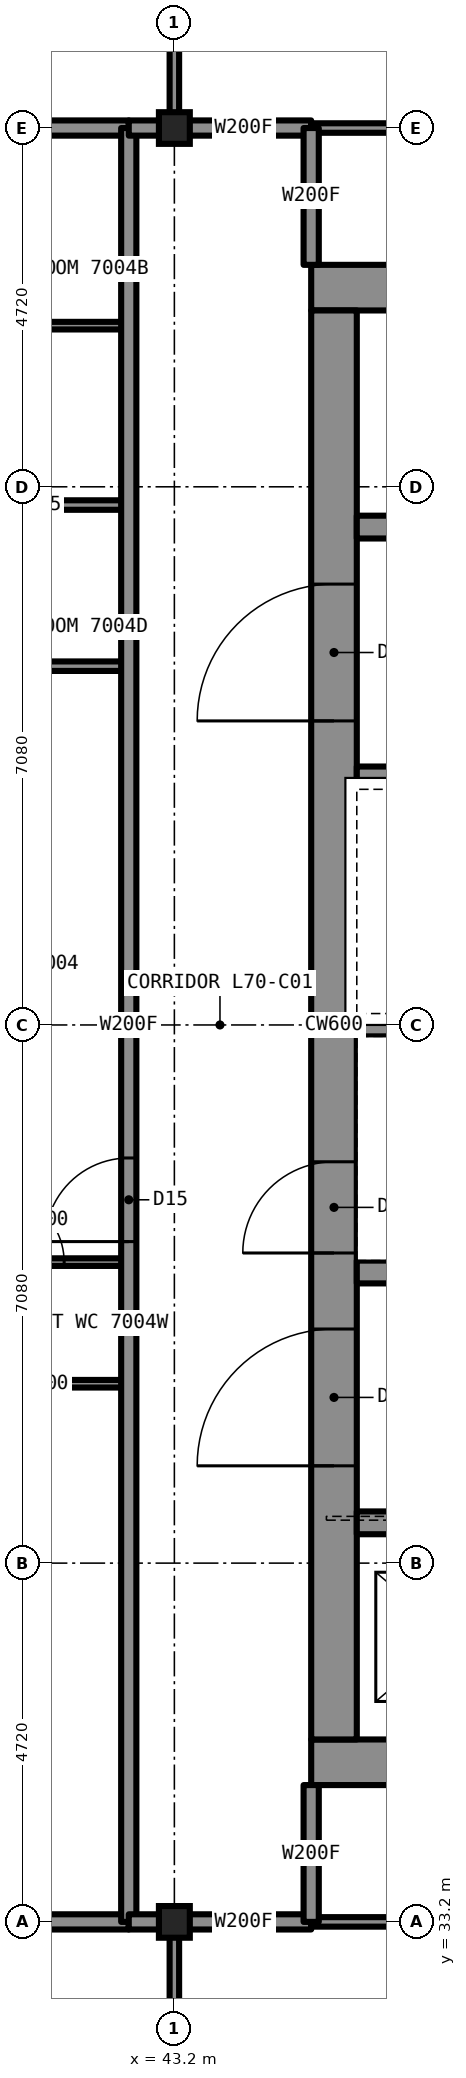
"""IFC4 building model, lengths in metres.
Left out: names, types, materials, properties, quantities, classifications, styles, units other than length and angle.
Written with IfcOpenShell. Run it as: python <this file> out.ifc"""

import sys

from ifc_helpers import new_model, si_unit, direction, frame, frame_2d, origin, origin_2d, place, context, subcontext, project, spatial, rectangle, i_section, extrude, element, fill, save


model = new_model("IFC4")
c1 = context("Model", 3, precision=1e-05, world=origin(), true_north=direction((0.0, 1.0)))
c2 = subcontext(c1, "Body", "Model", "MODEL_VIEW")
j1 = project(units=[si_unit("LENGTHUNIT", "METRE"), si_unit("PLANEANGLEUNIT", "RADIAN")], contexts=[c1])
p1 = place(None, origin())
s1 = spatial("IfcSite", under=j1, at=p1, CompositionType="ELEMENT")
p2 = place(p1, origin())
s2 = spatial("IfcBuilding", under=s1, at=p2, CompositionType="ELEMENT")
p3 = place(p2, frame((0.0, 0.0, 254.7)))
s3 = spatial("IfcBuildingStorey", under=s2, at=p3, CompositionType="ELEMENT", Elevation=254.7)
for number, where, z_axis, x_axis in (
    (1, (43.2, 33.2, 0.0), (0.0, 0.0, 1.0), (1.0, 0.0, 0.0)),
    (2, (43.2, 56.8, 0.0), (0.0, 0.0, 1.0), (1.0, 0.0, 0.0)),
):
    element("IfcColumn", number, at=place(p3, frame(where, z_axis=z_axis, x_axis=x_axis)), inside=s3, PredefinedType="COLUMN", context=c2, shape_type="SweptSolid", body=[
        extrude(i_section(OverallWidth=0.406, OverallDepth=0.417, WebThickness=0.03, FlangeThickness=0.048, at=origin_2d()), origin(), (0.0, 0.0, 1.0), 3.5),
    ])
for number, where, z_axis, x_axis in (
    (3, (45.0, 54.7, 0.0), (0.0, 0.0, 1.0), (1.0, 0.0, 0.0)),
    (4, (45.0, 35.3, 0.0), (0.0, 0.0, 1.0), (1.0, 0.0, 0.0)),
):
    element("IfcWall", number, at=place(p3, frame(where, z_axis=z_axis, x_axis=x_axis)), inside=s3, PredefinedType="SHEAR", context=c2, shape_type="SweptSolid", body=[
        extrude(rectangle(XDim=20.0, YDim=0.6, at=frame_2d((10.0, 0.0))), origin(), (0.0, 0.0, 1.0), 3.5),
    ])
p4 = place(p3, frame((45.3, 35.6, 0.0), z_axis=(0.0, 0.0, 1.0), x_axis=(0.0, 1.0, 0.0)))
e5 = element("IfcWall", 5, at=p4, inside=s3, PredefinedType="SHEAR", context=c2, shape_type="SweptSolid", body=[
    extrude(rectangle(XDim=18.8, YDim=0.6, at=frame_2d((9.4, 0.0))), origin(), (0.0, 0.0, 1.0), 3.5),
])
p5 = place(p4, frame((13.4, 0.0, 0.0)))
e6 = element("IfcOpeningElement", 6, at=p5, cuts=e5, PredefinedType="OPENING", context=c2, shape_type="SweptSolid", body=[
    extrude(rectangle(XDim=1.8, YDim=2.2, at=frame_2d((0.9, 1.1))), frame((0.0, 0.31, 0.0), z_axis=(0.0, -1.0, 0.0), x_axis=(1.0, 0.0, 0.0)), (0.0, 0.0, 1.0), 0.62),
])
p6 = place(p4, frame((3.6, 0.0, 0.0)))
e7 = element("IfcOpeningElement", 7, at=p6, cuts=e5, PredefinedType="OPENING", context=c2, shape_type="SweptSolid", body=[
    extrude(rectangle(XDim=1.8, YDim=2.2, at=frame_2d((0.9, 1.1))), frame((0.0, 0.31, 0.0), z_axis=(0.0, -1.0, 0.0), x_axis=(1.0, 0.0, 0.0)), (0.0, 0.0, 1.0), 0.62),
])
p7 = place(p4, frame((6.4, 0.0, 0.0)))
e8 = element("IfcOpeningElement", 8, at=p7, cuts=e5, PredefinedType="OPENING", context=c2, shape_type="SweptSolid", body=[
    extrude(rectangle(XDim=1.2, YDim=2.2, at=frame_2d((0.6, 1.1))), frame((0.0, 0.31, 0.0), z_axis=(0.0, -1.0, 0.0), x_axis=(1.0, 0.0, 0.0)), (0.0, 0.0, 1.0), 0.62),
])
p8 = place(p3, frame((45.6, 51.55, 0.0), z_axis=(0.0, 0.0, 1.0), x_axis=(1.0, 0.0, 0.0)))
e9 = element("IfcWall", 9, at=p8, inside=s3, PredefinedType="SHEAR", context=c2, shape_type="SweptSolid", body=[
    extrude(rectangle(XDim=18.8, YDim=0.3, at=frame_2d((9.4, 0.0))), origin(), (0.0, 0.0, 1.0), 3.5),
])
p9 = place(p8, frame((4.8, 0.0, 0.0)))
e10 = element("IfcOpeningElement", 10, at=p9, cuts=e9, PredefinedType="OPENING", context=c2, shape_type="SweptSolid", body=[
    extrude(rectangle(XDim=1.0, YDim=2.1, at=frame_2d((0.5, 1.05))), frame((0.0, 0.16, 0.0), z_axis=(0.0, -1.0, 0.0), x_axis=(1.0, 0.0, 0.0)), (0.0, 0.0, 1.0), 0.32),
])
p10 = place(p8, frame((11.6, 0.0, 0.0)))
e11 = element("IfcOpeningElement", 11, at=p10, cuts=e9, PredefinedType="OPENING", context=c2, shape_type="SweptSolid", body=[
    extrude(rectangle(XDim=1.1, YDim=2.2, at=frame_2d((0.55, 1.1))), frame((0.0, 0.16, 0.0), z_axis=(0.0, -1.0, 0.0), x_axis=(1.0, 0.0, 0.0)), (0.0, 0.0, 1.0), 0.32),
])
p11 = place(p8, frame((14.3, 0.0, 0.0)))
e12 = element("IfcOpeningElement", 12, at=p11, cuts=e9, PredefinedType="OPENING", context=c2, shape_type="SweptSolid", body=[
    extrude(rectangle(XDim=1.1, YDim=2.2, at=frame_2d((0.55, 1.1))), frame((0.0, 0.16, 0.0), z_axis=(0.0, -1.0, 0.0), x_axis=(1.0, 0.0, 0.0)), (0.0, 0.0, 1.0), 0.32),
])
p12 = place(p3, frame((45.6, 38.45, 0.0), z_axis=(0.0, 0.0, 1.0), x_axis=(1.0, 0.0, 0.0)))
e13 = element("IfcWall", 13, at=p12, inside=s3, PredefinedType="SHEAR", context=c2, shape_type="SweptSolid", body=[
    extrude(rectangle(XDim=18.8, YDim=0.3, at=frame_2d((9.4, 0.0))), origin(), (0.0, 0.0, 1.0), 3.5),
])
p13 = place(p12, frame((0.7, 0.0, 0.0)))
e14 = element("IfcOpeningElement", 14, at=p13, cuts=e13, PredefinedType="OPENING", context=c2, shape_type="SweptSolid", body=[
    extrude(rectangle(XDim=1.1, YDim=2.2, at=frame_2d((0.55, 1.1))), frame((0.0, 0.16, 0.0), z_axis=(0.0, -1.0, 0.0), x_axis=(1.0, 0.0, 0.0)), (0.0, 0.0, 1.0), 0.32),
])
p14 = place(p12, frame((3.4, 0.0, 0.0)))
e15 = element("IfcOpeningElement", 15, at=p14, cuts=e13, PredefinedType="OPENING", context=c2, shape_type="SweptSolid", body=[
    extrude(rectangle(XDim=1.1, YDim=2.2, at=frame_2d((0.55, 1.1))), frame((0.0, 0.16, 0.0), z_axis=(0.0, -1.0, 0.0), x_axis=(1.0, 0.0, 0.0)), (0.0, 0.0, 1.0), 0.32),
])
p15 = place(p12, frame((6.1, 0.0, 0.0)))
e16 = element("IfcOpeningElement", 16, at=p15, cuts=e13, PredefinedType="OPENING", context=c2, shape_type="SweptSolid", body=[
    extrude(rectangle(XDim=1.1, YDim=2.2, at=frame_2d((0.55, 1.1))), frame((0.0, 0.16, 0.0), z_axis=(0.0, -1.0, 0.0), x_axis=(1.0, 0.0, 0.0)), (0.0, 0.0, 1.0), 0.32),
])
p16 = place(p12, frame((8.8, 0.0, 0.0)))
e17 = element("IfcOpeningElement", 17, at=p16, cuts=e13, PredefinedType="OPENING", context=c2, shape_type="SweptSolid", body=[
    extrude(rectangle(XDim=1.1, YDim=2.2, at=frame_2d((0.55, 1.1))), frame((0.0, 0.16, 0.0), z_axis=(0.0, -1.0, 0.0), x_axis=(1.0, 0.0, 0.0)), (0.0, 0.0, 1.0), 0.32),
])
for number, where, z_axis, x_axis in (
    (18, (45.6, 48.25, 0.0), (0.0, 0.0, 1.0), (1.0, 0.0, 0.0)),
    (19, (45.6, 41.75, 0.0), (0.0, 0.0, 1.0), (1.0, 0.0, 0.0)),
):
    element("IfcWall", number, at=place(p3, frame(where, z_axis=z_axis, x_axis=x_axis)), inside=s3, PredefinedType="SHEAR", context=c2, shape_type="SweptSolid", body=[
        extrude(rectangle(XDim=7.1, YDim=0.3, at=frame_2d((3.55, 0.0))), origin(), (0.0, 0.0, 1.0), 3.5),
    ])
p17 = place(p3, frame((45.6, 45.0, 0.0), z_axis=(0.0, 0.0, 1.0), x_axis=(1.0, 0.0, 0.0)))
e20 = element("IfcWall", 20, at=p17, inside=s3, PredefinedType="SHEAR", context=c2, shape_type="SweptSolid", body=[
    extrude(rectangle(XDim=6.8, YDim=0.3, at=frame_2d((3.4, 0.0))), origin(), (0.0, 0.0, 1.0), 3.5),
])
p18 = place(p3, frame((43.22, 33.2, 0.0), z_axis=(0.0, 0.0, 1.0), x_axis=(1.0, 0.0, 0.0)))
e21 = element("IfcWall", 21, at=p18, inside=s3, PredefinedType="PARTITIONING", context=c2, shape_type="SweptSolid", body=[
    extrude(rectangle(XDim=1.78, YDim=0.2, at=frame_2d((0.89, 0.0))), origin(), (0.0, 0.0, 1.0), 3.33),
])
p19 = place(p3, frame((37.3, 33.2, 0.0), z_axis=(0.0, 0.0, 1.0), x_axis=(1.0, 0.0, 0.0)))
e22 = element("IfcWall", 22, at=p19, inside=s3, PredefinedType="PARTITIONING", context=c2, shape_type="SweptSolid", body=[
    extrude(rectangle(XDim=5.3, YDim=0.2, at=frame_2d((2.65, 0.0))), origin(), (0.0, 0.0, 1.0), 2.573),
])
p20 = place(p3, frame((45.0, 33.2, 0.0), z_axis=(0.0, 0.0, 1.0), x_axis=(1.0, 0.0, 0.0)))
e23 = element("IfcWall", 23, at=p20, inside=s3, PredefinedType="PARTITIONING", context=c2, shape_type="SweptSolid", body=[
    extrude(rectangle(XDim=2.92, YDim=0.125, at=frame_2d((1.46, 0.0))), origin(), (0.0, 0.0, 1.0), 3.33),
])
p21 = place(p3, frame((40.4, 41.88, 0.0), z_axis=(0.0, 0.0, 1.0), x_axis=(1.0, 0.0, 0.0)))
e24 = element("IfcWall", 24, at=p21, inside=s3, PredefinedType="PARTITIONING", context=c2, shape_type="SweptSolid", body=[
    extrude(rectangle(XDim=2.2, YDim=0.1, at=frame_2d((1.1, 0.0))), origin(), (0.0, 0.0, 1.0), 3.33),
])
p22 = place(p21, frame((0.45, 0.0, 0.0)))
e25 = element("IfcOpeningElement", 25, at=p22, cuts=e24, PredefinedType="OPENING", context=c2, shape_type="SweptSolid", body=[
    extrude(rectangle(XDim=0.9, YDim=2.1, at=frame_2d((0.45, 1.05))), frame((0.0, 0.06, 0.0), z_axis=(0.0, -1.0, 0.0), x_axis=(1.0, 0.0, 0.0)), (0.0, 0.0, 1.0), 0.12),
])
p23 = place(p3, frame((40.4, 40.28, 0.0), z_axis=(0.0, 0.0, 1.0), x_axis=(1.0, 0.0, 0.0)))
e26 = element("IfcWall", 26, at=p23, inside=s3, PredefinedType="PARTITIONING", context=c2, shape_type="SweptSolid", body=[
    extrude(rectangle(XDim=2.2, YDim=0.1, at=frame_2d((1.1, 0.0))), origin(), (0.0, 0.0, 1.0), 2.797),
])
p24 = place(p3, frame((43.22, 56.8, 0.0), z_axis=(0.0, 0.0, 1.0), x_axis=(1.0, 0.0, 0.0)))
e27 = element("IfcWall", 27, at=p24, inside=s3, PredefinedType="PARTITIONING", context=c2, shape_type="SweptSolid", body=[
    extrude(rectangle(XDim=1.78, YDim=0.2, at=frame_2d((0.89, 0.0))), origin(), (0.0, 0.0, 1.0), 3.33),
])
p25 = place(p3, frame((37.3, 56.8, 0.0), z_axis=(0.0, 0.0, 1.0), x_axis=(1.0, 0.0, 0.0)))
e28 = element("IfcWall", 28, at=p25, inside=s3, PredefinedType="PARTITIONING", context=c2, shape_type="SweptSolid", body=[
    extrude(rectangle(XDim=5.3, YDim=0.2, at=frame_2d((2.65, 0.0))), origin(), (0.0, 0.0, 1.0), 2.573),
])
p26 = place(p3, frame((45.0, 56.8, 0.0), z_axis=(0.0, 0.0, 1.0), x_axis=(1.0, 0.0, 0.0)))
e29 = element("IfcWall", 29, at=p26, inside=s3, PredefinedType="PARTITIONING", context=c2, shape_type="SweptSolid", body=[
    extrude(rectangle(XDim=2.92, YDim=0.125, at=frame_2d((1.46, 0.0))), origin(), (0.0, 0.0, 1.0), 3.33),
])
p27 = place(p3, frame((37.3, 49.72, 0.0), z_axis=(0.0, 0.0, 1.0), x_axis=(1.0, 0.0, 0.0)))
e30 = element("IfcWall", 30, at=p27, inside=s3, PredefinedType="PARTITIONING", context=c2, shape_type="SweptSolid", body=[
    extrude(rectangle(XDim=5.3, YDim=0.125, at=frame_2d((2.65, 0.0))), origin(), (0.0, 0.0, 1.0), 2.797),
])
p28 = place(p27, frame((0.85, 0.0, 0.0)))
e31 = element("IfcOpeningElement", 31, at=p28, cuts=e30, PredefinedType="OPENING", context=c2, shape_type="SweptSolid", body=[
    extrude(rectangle(XDim=0.9, YDim=2.2, at=frame_2d((0.45, 1.1))), frame((0.0, 0.073, 0.0), z_axis=(0.0, -1.0, 0.0), x_axis=(1.0, 0.0, 0.0)), (0.0, 0.0, 1.0), 0.145),
])
p29 = place(p3, frame((40.2, 51.84, 0.0), z_axis=(0.0, 0.0, 1.0), x_axis=(1.0, 0.0, 0.0)))
e32 = element("IfcWall", 32, at=p29, inside=s3, PredefinedType="PARTITIONING", context=c2, shape_type="SweptSolid", body=[
    extrude(rectangle(XDim=2.4, YDim=0.125, at=frame_2d((1.2, 0.0))), origin(), (0.0, 0.0, 1.0), 3.33),
])
p30 = place(p3, frame((39.6, 54.2, 0.0), z_axis=(0.0, 0.0, 1.0), x_axis=(1.0, 0.0, 0.0)))
e33 = element("IfcWall", 33, at=p30, inside=s3, PredefinedType="PARTITIONING", context=c2, shape_type="SweptSolid", body=[
    extrude(rectangle(XDim=3.0, YDim=0.1, at=frame_2d((1.5, 0.0))), origin(), (0.0, 0.0, 1.0), 3.33),
])
for number, where, z_axis, x_axis in (
    (34, (45.0, 33.2, 0.0), (0.0, 0.0, 1.0), (0.0, 1.0, 0.0)),
    (35, (45.0, 55.0, 0.0), (0.0, 0.0, 1.0), (0.0, 1.0, 0.0)),
):
    element("IfcWall", number, at=place(p3, frame(where, z_axis=z_axis, x_axis=x_axis)), inside=s3, PredefinedType="PARTITIONING", context=c2, shape_type="SweptSolid", body=[
        extrude(rectangle(XDim=1.8, YDim=0.2, at=frame_2d((0.9, 0.0))), origin(), (0.0, 0.0, 1.0), 3.33),
    ])
p31 = place(p3, frame((43.2, 27.3, 0.0), z_axis=(0.0, 0.0, 1.0), x_axis=(0.0, 1.0, 0.0)))
e36 = element("IfcWall", 36, at=p31, inside=s3, PredefinedType="PARTITIONING", context=c2, shape_type="SweptSolid", body=[
    extrude(rectangle(XDim=5.9, YDim=0.125, at=frame_2d((2.95, 0.0))), origin(), (0.0, 0.0, 1.0), 2.573),
])
p32 = place(p31, frame((1.45, 0.0, 0.0)))
e37 = element("IfcOpeningElement", 37, at=p32, cuts=e36, PredefinedType="OPENING", context=c2, shape_type="SweptSolid", body=[
    extrude(rectangle(XDim=0.9, YDim=2.2, at=frame_2d((0.45, 1.1))), frame((0.0, 0.073, 0.0), z_axis=(0.0, -1.0, 0.0), x_axis=(1.0, 0.0, 0.0)), (0.0, 0.0, 1.0), 0.145),
])
p33 = place(p3, frame((43.2, 56.8, 0.0), z_axis=(0.0, 0.0, 1.0), x_axis=(0.0, 1.0, 0.0)))
e38 = element("IfcWall", 38, at=p33, inside=s3, PredefinedType="PARTITIONING", context=c2, shape_type="SweptSolid", body=[
    extrude(rectangle(XDim=5.9, YDim=0.125, at=frame_2d((2.95, 0.0))), origin(), (0.0, 0.0, 1.0), 2.573),
])
p34 = place(p33, frame((3.55, 0.0, 0.0)))
e39 = element("IfcOpeningElement", 39, at=p34, cuts=e38, PredefinedType="OPENING", context=c2, shape_type="SweptSolid", body=[
    extrude(rectangle(XDim=0.9, YDim=2.2, at=frame_2d((0.45, 1.1))), frame((0.0, 0.073, 0.0), z_axis=(0.0, -1.0, 0.0), x_axis=(1.0, 0.0, 0.0)), (0.0, 0.0, 1.0), 0.145),
])
p35 = place(p3, frame((42.6, 33.2, 0.0), z_axis=(0.0, 0.0, 1.0), x_axis=(0.0, 1.0, 0.0)))
e40 = element("IfcWall", 40, at=p35, inside=s3, PredefinedType="PARTITIONING", context=c2, shape_type="SweptSolid", body=[
    extrude(rectangle(XDim=23.6, YDim=0.2, at=frame_2d((11.8, 0.0))), origin(), (0.0, 0.0, 1.0), 3.33),
])
p36 = place(p35, frame((8.95, 0.0, 0.0)))
e41 = element("IfcOpeningElement", 41, at=p36, cuts=e40, PredefinedType="OPENING", context=c2, shape_type="SweptSolid", body=[
    extrude(rectangle(XDim=1.1, YDim=2.2, at=frame_2d((0.55, 1.1))), frame((0.0, 0.11, 0.0), z_axis=(0.0, -1.0, 0.0), x_axis=(1.0, 0.0, 0.0)), (0.0, 0.0, 1.0), 0.22),
])
for number, where, z_axis, x_axis in (
    (42, (42.6, 33.2, 0.0), (0.0, 0.0, 1.0), (1.0, 0.0, 0.0)),
    (43, (42.6, 56.8, 0.0), (0.0, 0.0, 1.0), (1.0, 0.0, 0.0)),
):
    element("IfcWall", number, at=place(p3, frame(where, z_axis=z_axis, x_axis=x_axis)), inside=s3, PredefinedType="PARTITIONING", context=c2, shape_type="SweptSolid", body=[
        extrude(rectangle(XDim=0.62, YDim=0.2, at=frame_2d((0.31, 0.0))), origin(), (0.0, 0.0, 1.0), 2.573),
    ])
p37 = place(p36, origin())
e44 = element("IfcDoor", 44, at=p37, inside=s3, OperationType="SINGLE_SWING_LEFT", PredefinedType="DOOR", context=c2, shape_type="SweptSolid", body=[
    extrude(rectangle(XDim=1.1, YDim=2.2, at=frame_2d((0.55, 1.1))), frame((0.0, 0.025, 0.0), z_axis=(0.0, -1.0, 0.0), x_axis=(1.0, 0.0, 0.0)), (0.0, 0.0, 1.0), 0.05),
])
fill(e41, e44)
p38 = place(p22, origin())
e45 = element("IfcDoor", 45, at=p38, inside=s3, OperationType="SINGLE_SWING_LEFT", PredefinedType="DOOR", context=c2, shape_type="SweptSolid", body=[
    extrude(rectangle(XDim=0.9, YDim=2.1, at=frame_2d((0.45, 1.05))), frame((0.0, 0.025, 0.0), z_axis=(0.0, -1.0, 0.0), x_axis=(1.0, 0.0, 0.0)), (0.0, 0.0, 1.0), 0.05),
])
fill(e25, e45)
p39 = place(p5, origin())
e46 = element("IfcDoor", 46, at=p39, inside=s3, OperationType="DOUBLE_DOOR_SINGLE_SWING", PredefinedType="DOOR", context=c2, shape_type="SweptSolid", body=[
    extrude(rectangle(XDim=1.8, YDim=2.2, at=frame_2d((0.9, 1.1))), frame((0.0, 0.025, 0.0), z_axis=(0.0, -1.0, 0.0), x_axis=(1.0, 0.0, 0.0)), (0.0, 0.0, 1.0), 0.05),
])
fill(e6, e46)
p40 = place(p6, origin())
e47 = element("IfcDoor", 47, at=p40, inside=s3, OperationType="DOUBLE_DOOR_SINGLE_SWING", PredefinedType="DOOR", context=c2, shape_type="SweptSolid", body=[
    extrude(rectangle(XDim=1.8, YDim=2.2, at=frame_2d((0.9, 1.1))), frame((0.0, 0.025, 0.0), z_axis=(0.0, -1.0, 0.0), x_axis=(1.0, 0.0, 0.0)), (0.0, 0.0, 1.0), 0.05),
])
fill(e7, e47)
p41 = place(p7, origin())
e48 = element("IfcDoor", 48, at=p41, inside=s3, OperationType="SINGLE_SWING_LEFT", PredefinedType="DOOR", context=c2, shape_type="SweptSolid", body=[
    extrude(rectangle(XDim=1.2, YDim=2.2, at=frame_2d((0.6, 1.1))), frame((0.0, 0.025, 0.0), z_axis=(0.0, -1.0, 0.0), x_axis=(1.0, 0.0, 0.0)), (0.0, 0.0, 1.0), 0.05),
])
fill(e8, e48)
save(model, sys.argv[1])
